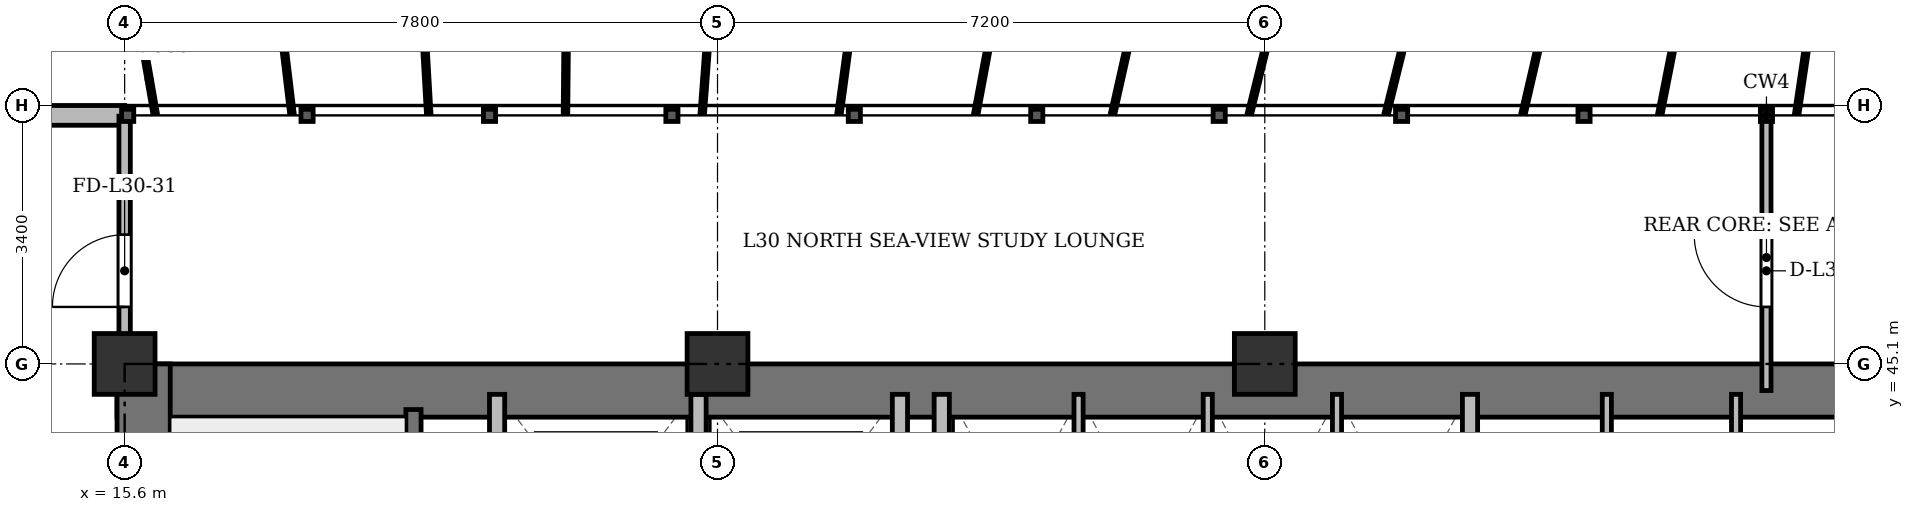
"""IFC4 building model, lengths in metres.
Left out: names, types, materials, properties, quantities, classifications, styles, units other than length and angle.
Written with IfcOpenShell. Run it as: python <this file> out.ifc"""

import sys

from ifc_helpers import new_model, si_unit, direction, frame, frame_2d, origin, origin_2d, place, context, subcontext, project, spatial, rectangle, extrude, source, transform, mapped, element, fill, save


model = new_model("IFC4")
c1 = context("Model", 3, precision=1e-05, world=origin(), true_north=direction((0.0, 1.0)))
c2 = subcontext(c1, "Body", "Model", "MODEL_VIEW")
j1 = project(units=[si_unit("LENGTHUNIT", "METRE"), si_unit("PLANEANGLEUNIT", "RADIAN")], contexts=[c1])
p1 = place(None, origin())
s1 = spatial("IfcSite", under=j1, at=p1, CompositionType="ELEMENT")
p2 = place(p1, origin())
s2 = spatial("IfcBuilding", under=s1, at=p2, CompositionType="ELEMENT")
p3 = place(p2, frame((0.0, 0.0, 117.7)))
s3 = spatial("IfcBuildingStorey", under=s2, at=p3, CompositionType="ELEMENT", Elevation=117.7)
m1 = source(origin(), c2, "Body", "SweptSolid", [
    extrude(rectangle(XDim=0.8, YDim=0.8, at=origin_2d()), origin(), (0.0, 0.0, 1.0), 3.6),
])
for number, where, z_axis, x_axis in (
    (1, (15.6, 45.1, 0.0), (0.0, 0.0, 1.0), (1.0, 0.0, 0.0)),
    (2, (23.4, 45.1, 0.0), (0.0, 0.0, 1.0), (1.0, 0.0, 0.0)),
    (3, (30.6, 45.1, 0.0), (0.0, 0.0, 1.0), (1.0, 0.0, 0.0)),
):
    element("IfcColumn", number, at=place(p3, frame(where, z_axis=z_axis, x_axis=x_axis)), inside=s3, PredefinedType="COLUMN", context=c2, shape_type="MappedRepresentation", body=[
        mapped(m1, transform((0.0, 0.0, 0.0), x_axis=(1.0, 0.0, 0.0), y_axis=(0.0, 1.0, 0.0), z_axis=(0.0, 0.0, 1.0), scale=1.0)),
    ])
p4 = place(p3, frame((7.6, 48.37, 0.0), z_axis=(0.0, 0.0, 1.0), x_axis=(1.0, 0.0, 0.0)))
e4 = element("IfcWall", 4, at=p4, inside=s3, PredefinedType="SOLIDWALL", context=c2, shape_type="SweptSolid", body=[
    extrude(rectangle(XDim=8.0, YDim=0.26, at=frame_2d((4.0, 0.0))), origin(), (0.0, 0.0, 1.0), 3.34),
])
p5 = place(p4, frame((0.768, 0.0, 0.9)))
e5 = element("IfcOpeningElement", 5, at=p5, cuts=e4, PredefinedType="OPENING", context=c2, shape_type="SweptSolid", body=[
    extrude(rectangle(XDim=1.2, YDim=1.65, at=frame_2d((0.6, 0.825))), frame((0.0, 0.14, 0.0), z_axis=(0.0, -1.0, 0.0), x_axis=(1.0, 0.0, 0.0)), (0.0, 0.0, 1.0), 0.28),
])
p6 = place(p4, frame((4.608, 0.0, 0.9)))
e6 = element("IfcOpeningElement", 6, at=p6, cuts=e4, PredefinedType="OPENING", context=c2, shape_type="SweptSolid", body=[
    extrude(rectangle(XDim=1.2, YDim=1.65, at=frame_2d((0.6, 0.825))), frame((0.0, 0.14, 0.0), z_axis=(0.0, -1.0, 0.0), x_axis=(1.0, 0.0, 0.0)), (0.0, 0.0, 1.0), 0.28),
])
p7 = place(p3, frame((15.5, 44.75, 0.0), z_axis=(0.0, 0.0, 1.0), x_axis=(1.0, 0.0, 0.0)))
e7 = element("IfcWall", 7, at=p7, inside=s3, PredefinedType="SHEAR", context=c2, shape_type="SweptSolid", body=[
    extrude(rectangle(XDim=43.4, YDim=0.7, at=frame_2d((21.7, 0.0))), origin(), (0.0, 0.0, 1.0), 3.34),
])
p8 = place(p3, frame((15.85, 33.4, 0.0), z_axis=(0.0, 0.0, 1.0), x_axis=(0.0, 1.0, 0.0)))
e8 = element("IfcWall", 8, at=p8, inside=s3, PredefinedType="SHEAR", context=c2, shape_type="SweptSolid", body=[
    extrude(rectangle(XDim=11.7, YDim=0.7, at=frame_2d((5.85, 0.0))), origin(), (0.0, 0.0, 1.0), 3.34),
])
p9 = place(p3, frame((19.4, 33.4, 0.0), z_axis=(0.0, 0.0, 1.0), x_axis=(0.0, 1.0, 0.0)))
e9 = element("IfcWall", 9, at=p9, inside=s3, PredefinedType="SHEAR", context=c2, shape_type="SweptSolid", body=[
    extrude(rectangle(XDim=11.1, YDim=0.2, at=frame_2d((5.55, 0.0))), origin(), (0.0, 0.0, 1.0), 3.34),
])
p10 = place(p9, frame((0.85, 0.0, 0.0)))
e10 = element("IfcOpeningElement", 10, at=p10, cuts=e9, PredefinedType="OPENING", context=c2, shape_type="SweptSolid", body=[
    extrude(rectangle(XDim=1.1, YDim=2.15, at=frame_2d((0.55, 1.075))), frame((0.0, 0.11, 0.0), z_axis=(0.0, -1.0, 0.0), x_axis=(1.0, 0.0, 0.0)), (0.0, 0.0, 1.0), 0.22),
])
for number, where, z_axis, x_axis in (
    (11, (20.5, 41.3, 0.0), (0.0, 0.0, 1.0), (0.0, 1.0, 0.0)),
    (12, (23.15, 41.3, 0.0), (0.0, 0.0, 1.0), (0.0, 1.0, 0.0)),
    (13, (25.8, 41.3, 0.0), (0.0, 0.0, 1.0), (0.0, 1.0, 0.0)),
):
    element("IfcWall", number, at=place(p3, frame(where, z_axis=z_axis, x_axis=x_axis)), inside=s3, PredefinedType="SOLIDWALL", context=c2, shape_type="SweptSolid", body=[
        extrude(rectangle(XDim=3.4, YDim=0.2, at=frame_2d((1.7, 0.0))), origin(), (0.0, 0.0, 1.0), 3.34),
    ])
p11 = place(p3, frame((26.35, 33.4, 0.0), z_axis=(0.0, 0.0, 1.0), x_axis=(0.0, 1.0, 0.0)))
e14 = element("IfcWall", 14, at=p11, inside=s3, PredefinedType="SOLIDWALL", context=c2, shape_type="SweptSolid", body=[
    extrude(rectangle(XDim=11.3, YDim=0.2, at=frame_2d((5.65, 0.0))), origin(), (0.0, 0.0, 1.0), 2.752),
])
p12 = place(p3, frame((33.3, 41.5, 0.0), z_axis=(0.0, 0.0, 1.0), x_axis=(0.0, 1.0, 0.0)))
e15 = element("IfcWall", 15, at=p12, inside=s3, PredefinedType="SOLIDWALL", context=c2, shape_type="SweptSolid", body=[
    extrude(rectangle(XDim=3.2, YDim=0.2, at=frame_2d((1.6, 0.0))), origin(), (0.0, 0.0, 1.0), 3.34),
])
for number, where, z_axis, x_axis in (
    (16, (28.15, 41.5, 0.0), (0.0, 0.0, 1.0), (0.0, 1.0, 0.0)),
    (17, (29.85, 41.5, 0.0), (0.0, 0.0, 1.0), (0.0, 1.0, 0.0)),
    (18, (31.55, 41.5, 0.0), (0.0, 0.0, 1.0), (0.0, 1.0, 0.0)),
    (19, (35.1, 41.5, 0.0), (0.0, 0.0, 1.0), (0.0, 1.0, 0.0)),
    (20, (36.8, 41.5, 0.0), (0.0, 0.0, 1.0), (0.0, 1.0, 0.0)),
):
    element("IfcWall", number, at=place(p3, frame(where, z_axis=z_axis, x_axis=x_axis)), inside=s3, PredefinedType="PARTITIONING", context=c2, shape_type="SweptSolid", body=[
        extrude(rectangle(XDim=3.2, YDim=0.12, at=frame_2d((1.6, 0.0))), origin(), (0.0, 0.0, 1.0), 3.34),
    ])
p13 = place(p3, frame((37.2, 44.75, 0.0), z_axis=(0.0, 0.0, 1.0), x_axis=(0.0, 1.0, 0.0)))
e21 = element("IfcWall", 21, at=p13, inside=s3, PredefinedType="PARTITIONING", context=c2, shape_type="SweptSolid", body=[
    extrude(rectangle(XDim=3.61, YDim=0.12, at=frame_2d((1.805, 0.0))), origin(), (0.0, 0.0, 1.0), 2.752),
])
p14 = place(p13, frame((1.1, 0.0, 0.0)))
e22 = element("IfcOpeningElement", 22, at=p14, cuts=e21, PredefinedType="OPENING", context=c2, shape_type="SweptSolid", body=[
    extrude(rectangle(XDim=0.95, YDim=2.15, at=frame_2d((0.475, 1.075))), frame((0.0, 0.07, 0.0), z_axis=(0.0, -1.0, 0.0), x_axis=(1.0, 0.0, 0.0)), (0.0, 0.0, 1.0), 0.14),
])
p15 = place(p3, frame((15.6, 44.75, 0.0), z_axis=(0.0, 0.0, 1.0), x_axis=(0.0, 1.0, 0.0)))
e23 = element("IfcWall", 23, at=p15, inside=s3, PredefinedType="PARTITIONING", context=c2, shape_type="SweptSolid", body=[
    extrude(rectangle(XDim=3.61, YDim=0.15, at=frame_2d((1.805, 0.0))), origin(), (0.0, 0.0, 1.0), 2.84),
])
p16 = place(p15, frame((1.1, 0.0, 0.0)))
e24 = element("IfcOpeningElement", 24, at=p16, cuts=e23, PredefinedType="OPENING", context=c2, shape_type="SweptSolid", body=[
    extrude(rectangle(XDim=0.95, YDim=2.15, at=frame_2d((0.475, 1.075))), frame((0.0, 0.085, 0.0), z_axis=(0.0, -1.0, 0.0), x_axis=(1.0, 0.0, 0.0)), (0.0, 0.0, 1.0), 0.17),
])
m2 = source(origin(), c2, "Body", "SweptSolid", [
    extrude(rectangle(XDim=0.95, YDim=2.15, at=frame_2d((0.475, 1.075))), frame((0.0, 0.025, 0.0), z_axis=(0.0, -1.0, 0.0), x_axis=(1.0, 0.0, 0.0)), (0.0, 0.0, 1.0), 0.05),
])
p17 = place(p14, origin())
e25 = element("IfcDoor", 25, at=p17, inside=s3, OperationType="SINGLE_SWING_RIGHT", PredefinedType="DOOR", context=c2, shape_type="MappedRepresentation", body=[
    mapped(m2, transform((0.0, 0.0, 0.0), x_axis=(1.0, 0.0, 0.0), y_axis=(0.0, 1.0, 0.0), z_axis=(0.0, 0.0, 1.0), scale=1.0)),
])
fill(e22, e25)
p18 = place(p16, origin())
e26 = element("IfcDoor", 26, at=p18, inside=s3, OperationType="SINGLE_SWING_LEFT", PredefinedType="DOOR", context=c2, shape_type="MappedRepresentation", body=[
    mapped(m2, transform((0.0, 0.0, 0.0), x_axis=(1.0, 0.0, 0.0), y_axis=(0.0, 1.0, 0.0), z_axis=(0.0, 0.0, 1.0), scale=1.0)),
])
fill(e24, e26)
save(model, sys.argv[1])
